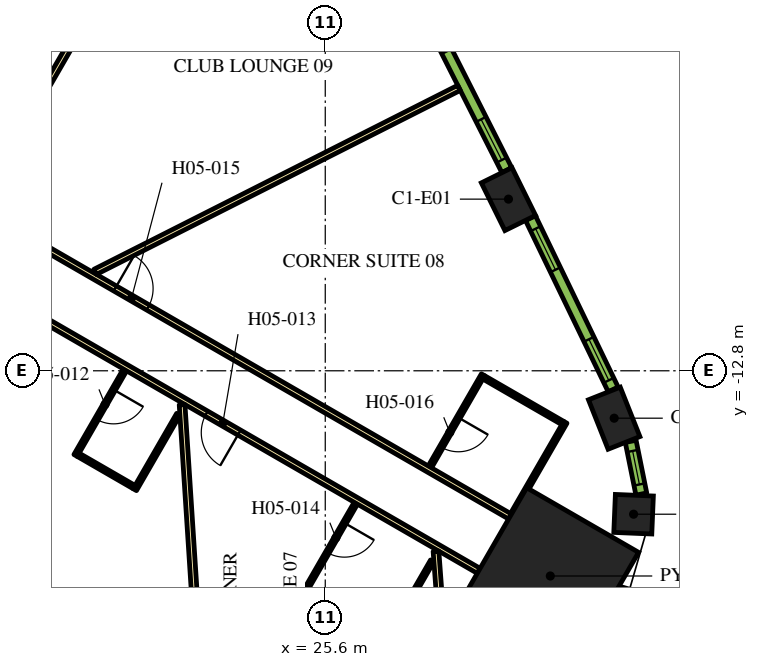
"""IFC4 building model, lengths in metres.
Left out: names, types, materials, properties, quantities, classifications, styles, units other than length and angle.
Written with IfcOpenShell. Run it as: python <this file> out.ifc"""

import sys

from ifc_helpers import new_model, si_unit, direction, frame, frame_2d, origin, origin_2d, place, context, subcontext, project, spatial, rectangle, extrude, element, fill, save


model = new_model("IFC4")
c1 = context("Model", 3, precision=1e-05, world=origin(), true_north=direction((0.0, 1.0)))
c2 = subcontext(c1, "Body", "Model", "MODEL_VIEW")
j1 = project(units=[si_unit("LENGTHUNIT", "METRE"), si_unit("PLANEANGLEUNIT", "RADIAN")], contexts=[c1])
p1 = place(None, origin())
s1 = spatial("IfcSite", under=j1, at=p1, CompositionType="ELEMENT")
p2 = place(p1, origin())
s2 = spatial("IfcBuilding", under=s1, at=p2, CompositionType="ELEMENT")
p3 = place(p2, frame((0.0, 0.0, 74.4)))
s3 = spatial("IfcBuildingStorey", under=s2, at=p3, CompositionType="ELEMENT", Elevation=74.4)
p4 = place(p3, frame((31.522, -18.199, 0.0), z_axis=(0.0, 0.0, 1.0), x_axis=(0.866025403784, -0.5, 0.0)))
e1 = element("IfcColumn", 1, at=p4, inside=s3, PredefinedType="COLUMN", context=c2, shape_type="SweptSolid", body=[
    extrude(rectangle(XDim=3.4, YDim=3.4, at=origin_2d()), origin(), (0.0, 0.0, 1.0), 3.9),
])
p5 = place(p3, frame((33.713, -16.574, 0.0), z_axis=(0.0, 0.0, 1.0), x_axis=(0.041582693819, 0.999135065732, 0.0)))
e2 = element("IfcColumn", 2, at=p5, inside=s3, PredefinedType="COLUMN", context=c2, shape_type="SweptSolid", body=[
    extrude(rectangle(XDim=1.0, YDim=1.0, at=origin_2d()), origin(), (0.0, 0.0, 1.0), 3.9),
])
for number, where, z_axis, x_axis in (
    (3, (33.203, -14.047, 0.0), (0.0, 0.0, 1.0), (-0.369, 0.929, 0.0)),
    (4, (30.421, -8.284, 0.0), (0.0, 0.0, 1.0), (-0.443, 0.897, 0.0)),
):
    element("IfcColumn", number, at=place(p3, frame(where, z_axis=z_axis, x_axis=x_axis)), inside=s3, PredefinedType="COLUMN", context=c2, shape_type="SweptSolid", body=[
        extrude(rectangle(XDim=1.4, YDim=0.9, at=origin_2d()), origin(), (0.0, 0.0, 1.0), 3.9),
    ])
p6 = place(p3, frame((16.412, -8.523, 0.0), z_axis=(0.0, 0.0, 1.0), x_axis=(0.866022197818, -0.500005552856, 0.0)))
e5 = element("IfcWall", 5, at=p6, inside=s3, PredefinedType="PARTITIONING", context=c2, shape_type="SweptSolid", body=[
    extrude(rectangle(XDim=16.224, YDim=0.15, at=frame_2d((8.112, 0.0))), origin(), (0.0, 0.0, 1.0), 2.7),
])
p7 = place(p6, frame((4.223, 0.0, 0.0)))
e6 = element("IfcOpeningElement", 6, at=p7, cuts=e5, PredefinedType="OPENING", context=c2, shape_type="SweptSolid", body=[
    extrude(rectangle(XDim=1.0, YDim=2.1, at=frame_2d((0.5, 1.05))), frame((0.0, 0.085, 0.0), z_axis=(0.0, -1.0, 0.0), x_axis=(1.0, 0.0, 0.0)), (0.0, 0.0, 1.0), 0.17),
])
p8 = place(p3, frame((19.081, -3.9, 0.0), z_axis=(0.0, 0.0, 1.0), x_axis=(-0.499974327079, -0.866040225545, 0.0)))
e7 = element("IfcWall", 7, at=p8, inside=s3, PredefinedType="PARTITIONING", context=c2, shape_type="SweptSolid", body=[
    extrude(rectangle(XDim=5.258, YDim=0.15, at=frame_2d((2.629, 0.0))), origin(), (0.0, 0.0, 1.0), 2.7),
])
p9 = place(p3, frame((29.638, -18.064, 0.0), z_axis=(0.0, 0.0, 1.0), x_axis=(-0.866026175601, 0.499998663172, 0.0)))
e8 = element("IfcWall", 8, at=p9, inside=s3, PredefinedType="PARTITIONING", context=c2, shape_type="SweptSolid", body=[
    extrude(rectangle(XDim=16.144, YDim=0.15, at=frame_2d((8.072, 0.0))), origin(), (0.0, 0.0, 1.0), 2.7),
])
p10 = place(p9, frame((14.714, 0.0, 0.0)))
e9 = element("IfcOpeningElement", 9, at=p10, cuts=e8, PredefinedType="OPENING", context=c2, shape_type="SweptSolid", body=[
    extrude(rectangle(XDim=1.0, YDim=2.1, at=frame_2d((0.5, 1.05))), frame((0.0, 0.085, 0.0), z_axis=(0.0, -1.0, 0.0), x_axis=(1.0, 0.0, 0.0)), (0.0, 0.0, 1.0), 0.17),
])
p11 = place(p9, frame((7.275, 0.0, 0.0)))
e10 = element("IfcOpeningElement", 10, at=p11, cuts=e8, PredefinedType="OPENING", context=c2, shape_type="SweptSolid", body=[
    extrude(rectangle(XDim=1.0, YDim=2.1, at=frame_2d((0.5, 1.05))), frame((0.0, 0.085, 0.0), z_axis=(0.0, -1.0, 0.0), x_axis=(1.0, 0.0, 0.0)), (0.0, 0.0, 1.0), 0.17),
])
p12 = place(p3, frame((29.12, -5.356, 0.0), z_axis=(0.0, 0.0, 1.0), x_axis=(-0.892401965553, -0.451241323327, 0.0)))
e11 = element("IfcWall", 11, at=p12, inside=s3, PredefinedType="PARTITIONING", context=c2, shape_type="SweptSolid", body=[
    extrude(rectangle(XDim=10.729, YDim=0.15, at=frame_2d((5.364, 0.0))), origin(), (0.0, 0.0, 1.0), 2.7),
])
p13 = place(p3, frame((22.355, -21.754, 0.0), z_axis=(0.0, 0.0, 1.0), x_axis=(-0.064639533143, 0.997908678565, 0.0)))
e12 = element("IfcWall", 12, at=p13, inside=s3, PredefinedType="PARTITIONING", context=c2, shape_type="SweptSolid", body=[
    extrude(rectangle(XDim=8.079, YDim=0.15, at=frame_2d((4.04, 0.0))), origin(), (0.0, 0.0, 1.0), 2.7),
])
p14 = place(p3, frame((28.79, -21.273, 0.0), z_axis=(0.0, 0.0, 1.0), x_axis=(-0.07382592098, 0.997271143366, 0.0)))
e13 = element("IfcWall", 13, at=p14, inside=s3, PredefinedType="PARTITIONING", context=c2, shape_type="SweptSolid", body=[
    extrude(rectangle(XDim=3.734, YDim=0.15, at=frame_2d((1.867, 0.0))), origin(), (0.0, 0.0, 1.0), 2.7),
])
p15 = place(p3, frame((20.33, -12.777, 0.0), z_axis=(0.0, 0.0, 1.0), x_axis=(-0.500006934395, -0.866021400173, 0.0)))
e14 = element("IfcWall", 14, at=p15, inside=s3, PredefinedType="PARTITIONING", context=c2, shape_type="SweptSolid", body=[
    extrude(rectangle(XDim=2.6, YDim=0.1, at=frame_2d((1.3, 0.0))), origin(), (0.0, 0.0, 1.0), 2.7),
])
p16 = place(p15, frame((0.6, 0.0, 0.0)))
e15 = element("IfcOpeningElement", 15, at=p16, cuts=e14, PredefinedType="OPENING", context=c2, shape_type="SweptSolid", body=[
    extrude(rectangle(XDim=0.9, YDim=2.1, at=frame_2d((0.45, 1.05))), frame((0.0, 0.06, 0.0), z_axis=(0.0, -1.0, 0.0), x_axis=(1.0, 0.0, 0.0)), (0.0, 0.0, 1.0), 0.12),
])
p17 = place(p3, frame((19.098, -15.01, 0.0), z_axis=(0.0, 0.0, 1.0), x_axis=(0.86605165483, -0.499954529098, 0.0)))
e16 = element("IfcWall", 16, at=p17, inside=s3, PredefinedType="PARTITIONING", context=c2, shape_type="SweptSolid", body=[
    extrude(rectangle(XDim=1.7, YDim=0.1, at=frame_2d((0.85, 0.0))), origin(), (0.0, 0.0, 1.0), 2.7),
])
p18 = place(p3, frame((21.734, -13.945, 0.0), z_axis=(0.0, 0.0, 1.0), x_axis=(-0.500014693593, -0.866016920268, 0.0)))
e17 = element("IfcWall", 17, at=p18, inside=s3, PredefinedType="PARTITIONING", context=c2, shape_type="SweptSolid", body=[
    extrude(rectangle(XDim=2.29, YDim=0.1, at=frame_2d((1.145, 0.0))), origin(), (0.0, 0.0, 1.0), 2.7),
])
p19 = place(p3, frame((26.405, -16.284, 0.0), z_axis=(0.0, 0.0, 1.0), x_axis=(-0.49998411664, -0.866034573852, 0.0)))
e18 = element("IfcWall", 18, at=p19, inside=s3, PredefinedType="PARTITIONING", context=c2, shape_type="SweptSolid", body=[
    extrude(rectangle(XDim=2.8, YDim=0.1, at=frame_2d((1.4, 0.0))), origin(), (0.0, 0.0, 1.0), 2.7),
])
p20 = place(p19, frame((0.6, 0.0, 0.0)))
e19 = element("IfcOpeningElement", 19, at=p20, cuts=e18, PredefinedType="OPENING", context=c2, shape_type="SweptSolid", body=[
    extrude(rectangle(XDim=0.9, YDim=2.1, at=frame_2d((0.45, 1.05))), frame((0.0, 0.06, 0.0), z_axis=(0.0, -1.0, 0.0), x_axis=(1.0, 0.0, 0.0)), (0.0, 0.0, 1.0), 0.12),
])
p21 = place(p3, frame((28.415, -17.802, 0.0), z_axis=(0.0, 0.0, 1.0), x_axis=(-0.499945955465, -0.866056604163, 0.0)))
e20 = element("IfcWall", 20, at=p21, inside=s3, PredefinedType="PARTITIONING", context=c2, shape_type="SweptSolid", body=[
    extrude(rectangle(XDim=2.49, YDim=0.1, at=frame_2d((1.245, 0.0))), origin(), (0.0, 0.0, 1.0), 2.7),
])
p22 = place(p3, frame((29.752, -12.905, 0.0), z_axis=(0.0, 0.0, 1.0), x_axis=(-0.500049511043, -0.865996816683, 0.0)))
e21 = element("IfcWall", 21, at=p22, inside=s3, PredefinedType="PARTITIONING", context=c2, shape_type="SweptSolid", body=[
    extrude(rectangle(XDim=2.8, YDim=0.1, at=frame_2d((1.4, 0.0))), origin(), (0.0, 0.0, 1.0), 2.7),
])
p23 = place(p22, frame((1.3, 0.0, 0.0)))
e22 = element("IfcOpeningElement", 22, at=p23, cuts=e21, PredefinedType="OPENING", context=c2, shape_type="SweptSolid", body=[
    extrude(rectangle(XDim=0.9, YDim=2.1, at=frame_2d((0.45, 1.05))), frame((0.0, 0.06, 0.0), z_axis=(0.0, -1.0, 0.0), x_axis=(1.0, 0.0, 0.0)), (0.0, 0.0, 1.0), 0.12),
])
p24 = place(p3, frame((29.771, -12.973, 0.0), z_axis=(0.0, 0.0, 1.0), x_axis=(0.865980596518, -0.500077600433, 0.0)))
e23 = element("IfcWall", 23, at=p24, inside=s3, PredefinedType="PARTITIONING", context=c2, shape_type="SweptSolid", body=[
    extrude(rectangle(XDim=2.4, YDim=0.1, at=frame_2d((1.2, 0.0))), origin(), (0.0, 0.0, 1.0), 2.7),
])
p25 = place(p3, frame((30.518, -16.58, 0.0), z_axis=(0.0, 0.0, 1.0), x_axis=(0.49998411664, 0.866034573852, 0.0)))
e24 = element("IfcWall", 24, at=p25, inside=s3, PredefinedType="PARTITIONING", context=c2, shape_type="SweptSolid", body=[
    extrude(rectangle(XDim=2.8, YDim=0.1, at=frame_2d((1.4, 0.0))), origin(), (0.0, 0.0, 1.0), 2.7),
])
p26 = place(p3, frame((33.257, -19.241, 0.0), z_axis=(0.0, 0.0, 1.0), x_axis=(0.278981320915, 0.960296528464, 0.0)))
e25 = element("IfcWall", 25, at=p26, inside=s3, PredefinedType="SOLIDWALL", context=c2, shape_type="SweptSolid", body=[
    extrude(rectangle(XDim=0.764, YDim=0.29, at=frame_2d((0.382, 0.0))), origin(), (0.0, 0.0, 1.0), 3.6),
])
p27 = place(p3, frame((33.917, -16.044, 0.0), z_axis=(0.0, 0.0, 1.0), x_axis=(-0.198106888228, 0.980180422594, 0.0)))
e26 = element("IfcWall", 26, at=p27, inside=s3, PredefinedType="SOLIDWALL", context=c2, shape_type="SweptSolid", body=[
    extrude(rectangle(XDim=1.415, YDim=0.29, at=frame_2d((0.708, 0.0))), origin(), (0.0, 0.0, 1.0), 3.6),
])
p28 = place(p27, frame((0.257, 0.0, 0.9)))
e27 = element("IfcOpeningElement", 27, at=p28, cuts=e26, PredefinedType="OPENING", context=c2, shape_type="SweptSolid", body=[
    extrude(rectangle(XDim=0.9, YDim=2.15, at=frame_2d((0.45, 1.075))), frame((0.0, 0.155, 0.0), z_axis=(0.0, -1.0, 0.0), x_axis=(1.0, 0.0, 0.0)), (0.0, 0.0, 1.0), 0.31),
])
p29 = place(p3, frame((33.176, -13.29, 0.0), z_axis=(0.0, 0.0, 1.0), x_axis=(-0.434664499056, 0.900592456808, 0.0)))
e28 = element("IfcWall", 28, at=p29, inside=s3, PredefinedType="SOLIDWALL", context=c2, shape_type="SweptSolid", body=[
    extrude(rectangle(XDim=5.006, YDim=0.29, at=frame_2d((2.503, 0.0))), origin(), (0.0, 0.0, 1.0), 3.6),
])
p30 = place(p29, frame((0.265, 0.0, 0.9)))
e29 = element("IfcOpeningElement", 29, at=p30, cuts=e28, PredefinedType="OPENING", context=c2, shape_type="SweptSolid", body=[
    extrude(rectangle(XDim=1.2, YDim=2.15, at=frame_2d((0.6, 1.075))), frame((0.0, 0.155, 0.0), z_axis=(0.0, -1.0, 0.0), x_axis=(1.0, 0.0, 0.0)), (0.0, 0.0, 1.0), 0.31),
])
p31 = place(p29, frame((3.496, 0.0, 0.9)))
e30 = element("IfcOpeningElement", 30, at=p31, cuts=e28, PredefinedType="OPENING", context=c2, shape_type="SweptSolid", body=[
    extrude(rectangle(XDim=1.2, YDim=2.15, at=frame_2d((0.6, 1.075))), frame((0.0, 0.155, 0.0), z_axis=(0.0, -1.0, 0.0), x_axis=(1.0, 0.0, 0.0)), (0.0, 0.0, 1.0), 0.31),
])
p32 = place(p3, frame((30.377, -7.521, 0.0), z_axis=(0.0, 0.0, 1.0), x_axis=(-0.451233929645, 0.892405704115, 0.0)))
e31 = element("IfcWall", 31, at=p32, inside=s3, PredefinedType="SOLIDWALL", context=c2, shape_type="SweptSolid", body=[
    extrude(rectangle(XDim=4.998, YDim=0.29, at=frame_2d((2.499, 0.0))), origin(), (0.0, 0.0, 1.0), 3.6),
])
p33 = place(p32, frame((0.297, 0.0, 0.9)))
e32 = element("IfcOpeningElement", 32, at=p33, cuts=e31, PredefinedType="OPENING", context=c2, shape_type="SweptSolid", body=[
    extrude(rectangle(XDim=1.2, YDim=2.15, at=frame_2d((0.6, 1.075))), frame((0.0, 0.155, 0.0), z_axis=(0.0, -1.0, 0.0), x_axis=(1.0, 0.0, 0.0)), (0.0, 0.0, 1.0), 0.31),
])
p34 = place(p32, frame((3.501, 0.0, 0.9)))
e33 = element("IfcOpeningElement", 33, at=p34, cuts=e31, PredefinedType="OPENING", context=c2, shape_type="SweptSolid", body=[
    extrude(rectangle(XDim=1.2, YDim=2.15, at=frame_2d((0.6, 1.075))), frame((0.0, 0.155, 0.0), z_axis=(0.0, -1.0, 0.0), x_axis=(1.0, 0.0, 0.0)), (0.0, 0.0, 1.0), 0.31),
])
p35 = place(p16, origin())
e34 = element("IfcDoor", 34, at=p35, inside=s3, OperationType="SINGLE_SWING_RIGHT", PredefinedType="DOOR", context=c2, shape_type="SweptSolid", body=[
    extrude(rectangle(XDim=0.9, YDim=2.1, at=frame_2d((0.45, 1.05))), frame((0.0, 0.025, 0.0), z_axis=(0.0, -1.0, 0.0), x_axis=(1.0, 0.0, 0.0)), (0.0, 0.0, 1.0), 0.05),
])
fill(e15, e34)
p36 = place(p11, origin())
e35 = element("IfcDoor", 35, at=p36, inside=s3, OperationType="SINGLE_SWING_RIGHT", PredefinedType="DOOR", context=c2, shape_type="SweptSolid", body=[
    extrude(rectangle(XDim=1.0, YDim=2.1, at=frame_2d((0.5, 1.05))), frame((0.0, 0.025, 0.0), z_axis=(0.0, -1.0, 0.0), x_axis=(1.0, 0.0, 0.0)), (0.0, 0.0, 1.0), 0.05),
])
fill(e10, e35)
p37 = place(p20, origin())
e36 = element("IfcDoor", 36, at=p37, inside=s3, OperationType="SINGLE_SWING_LEFT", PredefinedType="DOOR", context=c2, shape_type="SweptSolid", body=[
    extrude(rectangle(XDim=0.9, YDim=2.1, at=frame_2d((0.45, 1.05))), frame((0.0, 0.025, 0.0), z_axis=(0.0, -1.0, 0.0), x_axis=(1.0, 0.0, 0.0)), (0.0, 0.0, 1.0), 0.05),
])
fill(e19, e36)
p38 = place(p7, origin())
e37 = element("IfcDoor", 37, at=p38, inside=s3, OperationType="SINGLE_SWING_LEFT", PredefinedType="DOOR", context=c2, shape_type="SweptSolid", body=[
    extrude(rectangle(XDim=1.0, YDim=2.1, at=frame_2d((0.5, 1.05))), frame((0.0, 0.025, 0.0), z_axis=(0.0, -1.0, 0.0), x_axis=(1.0, 0.0, 0.0)), (0.0, 0.0, 1.0), 0.05),
])
fill(e6, e37)
p39 = place(p23, origin())
e38 = element("IfcDoor", 38, at=p39, inside=s3, OperationType="SINGLE_SWING_LEFT", PredefinedType="DOOR", context=c2, shape_type="SweptSolid", body=[
    extrude(rectangle(XDim=0.9, YDim=2.1, at=frame_2d((0.45, 1.05))), frame((0.0, 0.025, 0.0), z_axis=(0.0, -1.0, 0.0), x_axis=(1.0, 0.0, 0.0)), (0.0, 0.0, 1.0), 0.05),
])
fill(e22, e38)
p40 = place(p28, origin())
e39 = element("IfcWindow", 39, at=p40, inside=s3, PartitioningType="SINGLE_PANEL", PredefinedType="WINDOW", context=c2, shape_type="SweptSolid", body=[
    extrude(rectangle(XDim=0.9, YDim=2.15, at=frame_2d((0.45, 1.075))), frame((0.0, 0.015, 0.0), z_axis=(0.0, -1.0, 0.0), x_axis=(1.0, 0.0, 0.0)), (0.0, 0.0, 1.0), 0.06),
])
fill(e27, e39)
p41 = place(p30, origin())
e40 = element("IfcWindow", 40, at=p41, inside=s3, PartitioningType="DOUBLE_PANEL_VERTICAL", PredefinedType="WINDOW", context=c2, shape_type="SweptSolid", body=[
    extrude(rectangle(XDim=1.2, YDim=2.15, at=frame_2d((0.6, 1.075))), frame((0.0, 0.015, 0.0), z_axis=(0.0, -1.0, 0.0), x_axis=(1.0, 0.0, 0.0)), (0.0, 0.0, 1.0), 0.06),
])
fill(e29, e40)
p42 = place(p31, origin())
e41 = element("IfcWindow", 41, at=p42, inside=s3, PartitioningType="DOUBLE_PANEL_VERTICAL", PredefinedType="WINDOW", context=c2, shape_type="SweptSolid", body=[
    extrude(rectangle(XDim=1.2, YDim=2.15, at=frame_2d((0.6, 1.075))), frame((0.0, 0.015, 0.0), z_axis=(0.0, -1.0, 0.0), x_axis=(1.0, 0.0, 0.0)), (0.0, 0.0, 1.0), 0.06),
])
fill(e30, e41)
p43 = place(p33, origin())
e42 = element("IfcWindow", 42, at=p43, inside=s3, PartitioningType="DOUBLE_PANEL_VERTICAL", PredefinedType="WINDOW", context=c2, shape_type="SweptSolid", body=[
    extrude(rectangle(XDim=1.2, YDim=2.15, at=frame_2d((0.6, 1.075))), frame((0.0, 0.015, 0.0), z_axis=(0.0, -1.0, 0.0), x_axis=(1.0, 0.0, 0.0)), (0.0, 0.0, 1.0), 0.06),
])
fill(e32, e42)
save(model, sys.argv[1])
